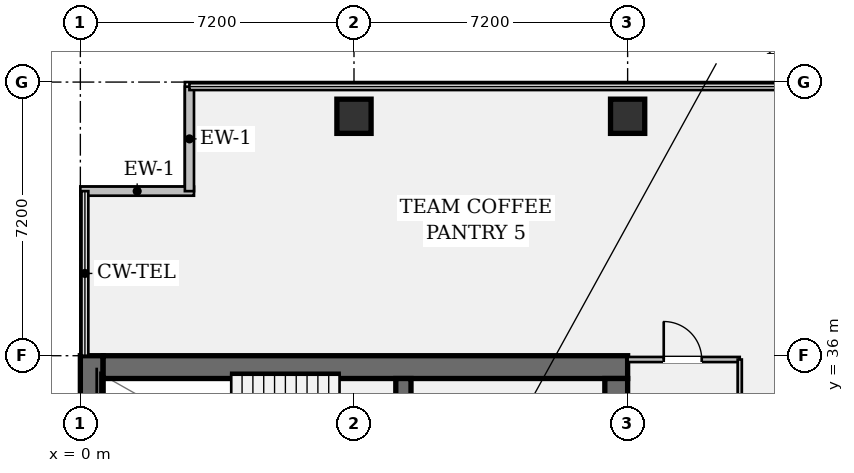
"""IFC4 building model, lengths in metres.
Left out: names, types, materials, properties, quantities, classifications, styles, units other than length and angle.
Written with IfcOpenShell. Run it as: python <this file> out.ifc"""

import sys

from ifc_helpers import new_model, si_unit, direction, frame, frame_2d, origin, origin_2d, place, context, subcontext, project, spatial, rectangle, hollow_rectangle, extrude, element, fill, save


model = new_model("IFC4")
c1 = context("Model", 3, precision=1e-05, world=origin(), true_north=direction((0.0, 1.0)))
c2 = subcontext(c1, "Body", "Model", "MODEL_VIEW")
j1 = project(units=[si_unit("LENGTHUNIT", "METRE"), si_unit("PLANEANGLEUNIT", "RADIAN")], contexts=[c1])
p1 = place(None, origin())
s1 = spatial("IfcSite", under=j1, at=p1, CompositionType="ELEMENT")
p2 = place(p1, origin())
s2 = spatial("IfcBuilding", under=s1, at=p2, CompositionType="ELEMENT")
p3 = place(p2, frame((0.0, 0.0, 125.3)))
s3 = spatial("IfcBuildingStorey", under=s2, at=p3, CompositionType="ELEMENT", Elevation=125.3)
p4 = place(p3, frame((0.3, 7.2, 0.0), z_axis=(0.0, 0.0, 1.0), x_axis=(0.0, 1.0, 0.0)))
e1 = element("IfcWall", 1, at=p4, inside=s3, PredefinedType="SHEAR", context=c2, shape_type="SweptSolid", body=[
    extrude(rectangle(XDim=28.8, YDim=0.6, at=frame_2d((14.4, 0.0))), origin(), (0.0, 0.0, 1.0), 3.58),
])
p5 = place(p3, frame((0.6, 35.7, 0.0), z_axis=(0.0, 0.0, 1.0), x_axis=(1.0, 0.0, 0.0)))
e2 = element("IfcWall", 2, at=p5, inside=s3, PredefinedType="SHEAR", context=c2, shape_type="SweptSolid", body=[
    extrude(rectangle(XDim=13.8, YDim=0.6, at=frame_2d((6.9, 0.0))), origin(), (0.0, 0.0, 1.0), 3.58),
])
p6 = place(p3, frame((14.1, 35.4, 0.0), z_axis=(0.0, 0.0, 1.0), x_axis=(0.0, -1.0, 0.0)))
e3 = element("IfcWall", 3, at=p6, inside=s3, PredefinedType="SHEAR", context=c2, shape_type="SweptSolid", body=[
    extrude(rectangle(XDim=27.6, YDim=0.6, at=frame_2d((13.8, 0.0))), origin(), (0.0, 0.0, 1.0), 3.58),
])
p7 = place(p6, frame((1.3, 0.0, 0.0)))
e4 = element("IfcOpeningElement", 4, at=p7, cuts=e3, PredefinedType="OPENING", context=c2, shape_type="SweptSolid", body=[
    extrude(rectangle(XDim=1.2, YDim=2.15, at=frame_2d((0.6, 1.075))), frame((0.0, 0.312, 0.0), z_axis=(0.0, -1.0, 0.0), x_axis=(1.0, 0.0, 0.0)), (0.0, 0.0, 1.0), 0.624),
])
p8 = place(p6, frame((25.25, 0.0, 0.0)))
e5 = element("IfcOpeningElement", 5, at=p8, cuts=e3, PredefinedType="OPENING", context=c2, shape_type="SweptSolid", body=[
    extrude(rectangle(XDim=1.2, YDim=2.15, at=frame_2d((0.6, 1.075))), frame((0.0, 0.312, 0.0), z_axis=(0.0, -1.0, 0.0), x_axis=(1.0, 0.0, 0.0)), (0.0, 0.0, 1.0), 0.624),
])
p9 = place(p6, frame((14.6, 0.0, 0.0)))
e6 = element("IfcOpeningElement", 6, at=p9, cuts=e3, PredefinedType="OPENING", context=c2, shape_type="SweptSolid", body=[
    extrude(rectangle(XDim=1.6, YDim=2.2, at=frame_2d((0.8, 1.1))), frame((0.0, 0.312, 0.0), z_axis=(0.0, -1.0, 0.0), x_axis=(1.0, 0.0, 0.0)), (0.0, 0.0, 1.0), 0.624),
])
p10 = place(p3, frame((8.5, 31.72, 0.0), z_axis=(0.0, 0.0, 1.0), x_axis=(0.0, 1.0, 0.0)))
e7 = element("IfcWall", 7, at=p10, inside=s3, PredefinedType="SHEAR", context=c2, shape_type="SweptSolid", body=[
    extrude(rectangle(XDim=3.68, YDim=0.4, at=frame_2d((1.84, 0.0))), origin(), (0.0, 0.0, 1.0), 3.58),
])
p11 = place(p10, frame((0.9, 0.0, 0.0)))
e8 = element("IfcOpeningElement", 8, at=p11, cuts=e7, PredefinedType="OPENING", context=c2, shape_type="SweptSolid", body=[
    extrude(rectangle(XDim=1.1, YDim=2.15, at=frame_2d((0.55, 1.075))), frame((0.0, 0.212, 0.0), z_axis=(0.0, -1.0, 0.0), x_axis=(1.0, 0.0, 0.0)), (0.0, 0.0, 1.0), 0.424),
])
for number, where, z_axis, x_axis in (
    (9, (7.2, 42.3, 0.0), (0.0, 0.0, 1.0), (1.0, 0.0, 0.0)),
    (10, (14.4, 42.3, 0.0), (0.0, 0.0, 1.0), (1.0, 0.0, 0.0)),
):
    element("IfcColumn", number, at=place(p3, frame(where, z_axis=z_axis, x_axis=x_axis)), inside=s3, PredefinedType="COLUMN", context=c2, shape_type="SweptSolid", body=[
        extrude(hollow_rectangle(XDim=0.9, YDim=0.9, WallThickness=0.055, at=origin_2d()), origin(), (0.0, 0.0, 1.0), 3.58),
    ])
p12 = place(p3, frame((0.0, 40.33, 0.0), z_axis=(0.0, 0.0, 1.0), x_axis=(1.0, 0.0, 0.0)))
e11 = element("IfcWall", 11, at=p12, inside=s3, PredefinedType="STANDARD", context=c2, shape_type="SweptSolid", body=[
    extrude(rectangle(XDim=2.99, YDim=0.24, at=frame_2d((1.495, 0.0))), origin(), (0.0, 0.0, 1.0), 3.58),
])
p13 = place(p3, frame((2.87, 40.33, 0.0), z_axis=(0.0, 0.0, 1.0), x_axis=(0.0, 1.0, 0.0)))
e12 = element("IfcWall", 12, at=p13, inside=s3, PredefinedType="STANDARD", context=c2, shape_type="SweptSolid", body=[
    extrude(rectangle(XDim=2.75, YDim=0.24, at=frame_2d((1.375, 0.0))), origin(), (0.0, 0.0, 1.0), 3.58),
])
p14 = place(p3, frame((14.4, 35.9, 0.0), z_axis=(0.0, 0.0, 1.0), x_axis=(1.0, 0.0, 0.0)))
e13 = element("IfcWall", 13, at=p14, inside=s3, PredefinedType="PARTITIONING", context=c2, shape_type="SweptSolid", body=[
    extrude(rectangle(XDim=2.95, YDim=0.135, at=frame_2d((1.475, 0.0))), origin(), (0.0, 0.0, 1.0), 2.869),
])
p15 = place(p14, frame((0.95, 0.0, 0.0)))
e14 = element("IfcOpeningElement", 14, at=p15, cuts=e13, PredefinedType="OPENING", context=c2, shape_type="SweptSolid", body=[
    extrude(rectangle(XDim=1.0, YDim=2.15, at=frame_2d((0.5, 1.075))), frame((0.0, 0.08, 0.0), z_axis=(0.0, -1.0, 0.0), x_axis=(1.0, 0.0, 0.0)), (0.0, 0.0, 1.0), 0.159),
])
p16 = place(p3, frame((17.35, 20.7, 0.0), z_axis=(0.0, 0.0, 1.0), x_axis=(0.0, 1.0, 0.0)))
e15 = element("IfcWall", 15, at=p16, inside=s3, PredefinedType="PARTITIONING", context=c2, shape_type="SweptSolid", body=[
    extrude(rectangle(XDim=15.2, YDim=0.11, at=frame_2d((7.6, 0.0))), origin(), (0.0, 0.0, 1.0), 2.869),
])
p17 = place(p16, frame((5.2, 0.0, 0.0)))
e16 = element("IfcOpeningElement", 16, at=p17, cuts=e15, PredefinedType="OPENING", context=c2, shape_type="SweptSolid", body=[
    extrude(rectangle(XDim=0.92, YDim=2.15, at=frame_2d((0.46, 1.075))), frame((0.0, 0.067, 0.0), z_axis=(0.0, -1.0, 0.0), x_axis=(1.0, 0.0, 0.0)), (0.0, 0.0, 1.0), 0.134),
])
p18 = place(p16, frame((10.6, 0.0, 0.0)))
e17 = element("IfcOpeningElement", 17, at=p18, cuts=e15, PredefinedType="OPENING", context=c2, shape_type="SweptSolid", body=[
    extrude(rectangle(XDim=1.0, YDim=2.15, at=frame_2d((0.5, 1.075))), frame((0.0, 0.067, 0.0), z_axis=(0.0, -1.0, 0.0), x_axis=(1.0, 0.0, 0.0)), (0.0, 0.0, 1.0), 0.134),
])
p19 = place(p15, origin())
e18 = element("IfcDoor", 18, at=p19, inside=s3, OperationType="SINGLE_SWING_LEFT", PredefinedType="DOOR", context=c2, shape_type="SweptSolid", body=[
    extrude(rectangle(XDim=1.0, YDim=2.15, at=frame_2d((0.5, 1.075))), frame((0.0, 0.025, 0.0), z_axis=(0.0, -1.0, 0.0), x_axis=(1.0, 0.0, 0.0)), (0.0, 0.0, 1.0), 0.05),
])
fill(e14, e18)
save(model, sys.argv[1])
